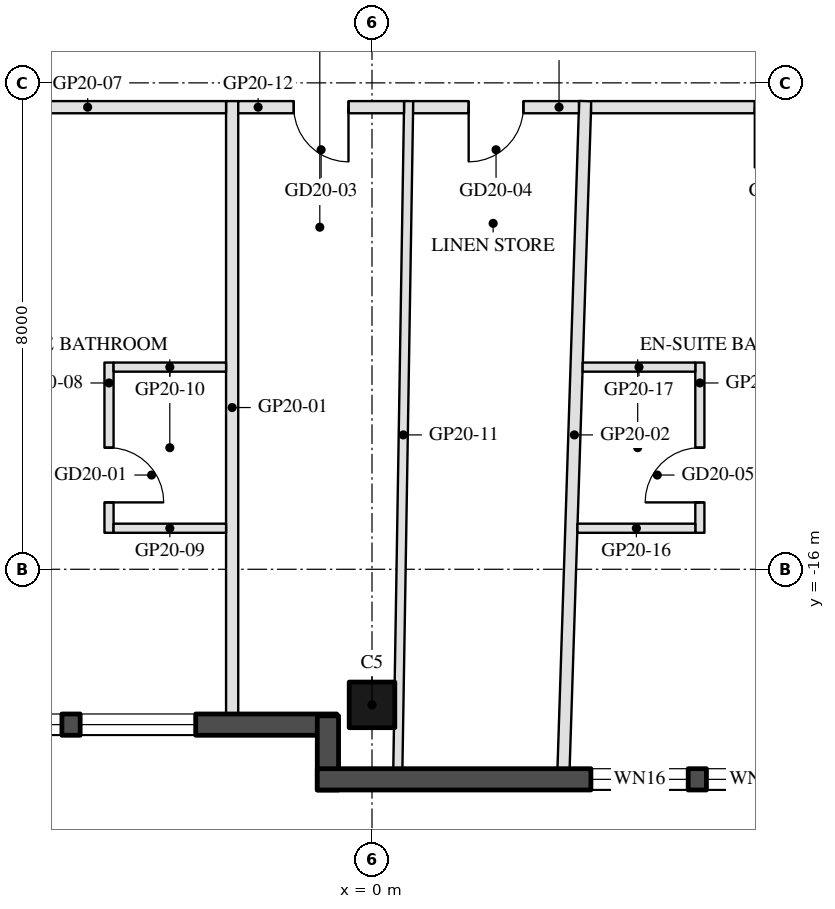
"""IFC4 building model, lengths in metres.
Left out: names, types, materials, properties, quantities, classifications, styles, units other than length and angle.
Written with IfcOpenShell. Run it as: python <this file> out.ifc"""

import sys

from ifc_helpers import new_model, si_unit, direction, frame, frame_2d, origin, origin_2d, place, context, subcontext, project, spatial, rectangle, hollow_rectangle, extrude, element, fill, save


model = new_model("IFC4")
c1 = context("Model", 3, precision=1e-05, world=origin(), true_north=direction((0.0, 1.0)))
c2 = subcontext(c1, "Body", "Model", "MODEL_VIEW")
j1 = project(units=[si_unit("LENGTHUNIT", "METRE"), si_unit("PLANEANGLEUNIT", "RADIAN")], contexts=[c1])
p1 = place(None, origin())
s1 = spatial("IfcSite", under=j1, at=p1, CompositionType="ELEMENT")
p2 = place(p1, origin())
s2 = spatial("IfcBuilding", under=s1, at=p2, CompositionType="ELEMENT")
p3 = place(p2, frame((0.0, 0.0, 209.5)))
s3 = spatial("IfcBuildingStorey", under=s2, at=p3, CompositionType="ELEMENT", Elevation=209.5)
p4 = place(p3, frame((0.0, -18.23, 0.0), z_axis=(0.0, 0.0, 1.0), x_axis=(-1.0, 0.0, 0.0)))
e1 = element("IfcColumn", 1, at=p4, inside=s3, PredefinedType="COLUMN", context=c2, shape_type="SweptSolid", body=[
    extrude(hollow_rectangle(XDim=0.75, YDim=0.75, WallThickness=0.035, at=origin_2d()), origin(), (0.0, 0.0, 1.0), 3.7),
])
p5 = place(p3, frame((-7.32, -18.555, 0.0), z_axis=(0.0, 0.0, 1.0), x_axis=(1.0, 0.0, 0.0)))
e2 = element("IfcWall", 2, at=p5, inside=s3, PredefinedType="SOLIDWALL", context=c2, shape_type="SweptSolid", body=[
    extrude(rectangle(XDim=6.74, YDim=0.35, at=frame_2d((3.37, 0.0))), origin(), (0.0, 0.0, 1.0), 3.55),
])
p6 = place(p5, frame((0.32, 0.0, 0.3)))
e3 = element("IfcOpeningElement", 3, at=p6, cuts=e2, PredefinedType="OPENING", context=c2, shape_type="SweptSolid", body=[
    extrude(rectangle(XDim=1.9, YDim=2.65, at=frame_2d((0.95, 1.325))), frame((0.0, 0.185, 0.0), z_axis=(0.0, -1.0, 0.0), x_axis=(1.0, 0.0, 0.0)), (0.0, 0.0, 1.0), 0.37),
])
p7 = place(p5, frame((2.521, 0.0, 0.3)))
e4 = element("IfcOpeningElement", 4, at=p7, cuts=e2, PredefinedType="OPENING", context=c2, shape_type="SweptSolid", body=[
    extrude(rectangle(XDim=1.9, YDim=2.65, at=frame_2d((0.95, 1.325))), frame((0.0, 0.185, 0.0), z_axis=(0.0, -1.0, 0.0), x_axis=(1.0, 0.0, 0.0)), (0.0, 0.0, 1.0), 0.37),
])
p8 = place(p3, frame((-0.725, -18.41, 0.0), z_axis=(0.0, 0.0, 1.0), x_axis=(0.0, -1.0, 0.0)))
e5 = element("IfcWall", 5, at=p8, inside=s3, PredefinedType="SOLIDWALL", context=c2, shape_type="SweptSolid", body=[
    extrude(rectangle(XDim=1.22, YDim=0.35, at=frame_2d((0.61, 0.0))), origin(), (0.0, 0.0, 1.0), 3.55),
])
p9 = place(p3, frame((-0.9, -19.455, 0.0), z_axis=(0.0, 0.0, 1.0), x_axis=(1.0, 0.0, 0.0)))
e6 = element("IfcWall", 6, at=p9, inside=s3, PredefinedType="SOLIDWALL", context=c2, shape_type="SweptSolid", body=[
    extrude(rectangle(XDim=9.7, YDim=0.35, at=frame_2d((4.85, 0.0))), origin(), (0.0, 0.0, 1.0), 3.55),
])
p10 = place(p9, frame((4.5, 0.0, 0.3)))
e7 = element("IfcOpeningElement", 7, at=p10, cuts=e6, PredefinedType="OPENING", context=c2, shape_type="SweptSolid", body=[
    extrude(rectangle(XDim=1.6, YDim=2.65, at=frame_2d((0.8, 1.325))), frame((0.0, 0.185, 0.0), z_axis=(0.0, -1.0, 0.0), x_axis=(1.0, 0.0, 0.0)), (0.0, 0.0, 1.0), 0.37),
])
p11 = place(p9, frame((6.4, 0.0, 0.3)))
e8 = element("IfcOpeningElement", 8, at=p11, cuts=e6, PredefinedType="OPENING", context=c2, shape_type="SweptSolid", body=[
    extrude(rectangle(XDim=1.6, YDim=2.65, at=frame_2d((0.8, 1.325))), frame((0.0, 0.185, 0.0), z_axis=(0.0, -1.0, 0.0), x_axis=(1.0, 0.0, 0.0)), (0.0, 0.0, 1.0), 0.37),
])
p12 = place(p3, frame((-2.3, -18.38, 0.0), z_axis=(0.0, 0.0, 1.0), x_axis=(0.0, 1.0, 0.0)))
e9 = element("IfcWall", 9, at=p12, inside=s3, PredefinedType="PARTITIONING", context=c2, shape_type="SweptSolid", body=[
    extrude(rectangle(XDim=10.08, YDim=0.2, at=frame_2d((5.04, 0.0))), origin(), (0.0, 0.0, 1.0), 3.06),
])
p13 = place(p3, frame((3.15, -19.28, 0.0), z_axis=(0.0, 0.0, 1.0), x_axis=(0.032468308586, 0.999472765481, 0.0)))
e10 = element("IfcWall", 10, at=p13, inside=s3, PredefinedType="PARTITIONING", context=c2, shape_type="SweptSolid", body=[
    extrude(rectangle(XDim=10.986, YDim=0.2, at=frame_2d((5.493, 0.0))), origin(), (0.0, 0.0, 1.0), 3.06),
])
p14 = place(p3, frame((-2.4, -8.4, 0.0), z_axis=(0.0, 0.0, 1.0), x_axis=(-1.0, 0.0, 0.0)))
e11 = element("IfcWall", 11, at=p14, inside=s3, PredefinedType="PARTITIONING", context=c2, shape_type="SweptSolid", body=[
    extrude(rectangle(XDim=7.588, YDim=0.2, at=frame_2d((3.794, 0.0))), origin(), (0.0, 0.0, 1.0), 2.95),
])
p15 = place(p14, frame((3.294, 0.0, 0.0)))
e12 = element("IfcOpeningElement", 12, at=p15, cuts=e11, PredefinedType="OPENING", context=c2, shape_type="SweptSolid", body=[
    extrude(rectangle(XDim=1.0, YDim=2.1, at=frame_2d((0.5, 1.05))), frame((0.0, 0.11, 0.0), z_axis=(0.0, -1.0, 0.0), x_axis=(1.0, 0.0, 0.0)), (0.0, 0.0, 1.0), 0.22),
])
p16 = place(p3, frame((-4.325, -12.6, 0.0), z_axis=(0.0, 0.0, 1.0), x_axis=(0.0, -1.0, 0.0)))
e13 = element("IfcWall", 13, at=p16, inside=s3, PredefinedType="PARTITIONING", context=c2, shape_type="SweptSolid", body=[
    extrude(rectangle(XDim=2.8, YDim=0.15, at=frame_2d((1.4, 0.0))), origin(), (0.0, 0.0, 1.0), 3.55),
])
p17 = place(p16, frame((1.4, 0.0, 0.0)))
e14 = element("IfcOpeningElement", 14, at=p17, cuts=e13, PredefinedType="OPENING", context=c2, shape_type="SweptSolid", body=[
    extrude(rectangle(XDim=0.9, YDim=2.1, at=frame_2d((0.45, 1.05))), frame((0.0, 0.085, 0.0), z_axis=(0.0, -1.0, 0.0), x_axis=(1.0, 0.0, 0.0)), (0.0, 0.0, 1.0), 0.17),
])
for number, where, z_axis, x_axis in (
    (15, (-4.25, -15.325, 0.0), (0.0, 0.0, 1.0), (1.0, 0.0, 0.0)),
    (16, (-4.25, -12.675, 0.0), (0.0, 0.0, 1.0), (1.0, 0.0, 0.0)),
):
    element("IfcWall", number, at=place(p3, frame(where, z_axis=z_axis, x_axis=x_axis)), inside=s3, PredefinedType="PARTITIONING", context=c2, shape_type="SweptSolid", body=[
        extrude(rectangle(XDim=1.85, YDim=0.15, at=frame_2d((0.925, 0.0))), origin(), (0.0, 0.0, 1.0), 2.95),
    ])
p18 = place(p3, frame((0.425, -19.28, 0.0), z_axis=(0.0, 0.0, 1.0), x_axis=(0.016229462675, 0.999868293597, 0.0)))
e17 = element("IfcWall", 17, at=p18, inside=s3, PredefinedType="PARTITIONING", context=c2, shape_type="SweptSolid", body=[
    extrude(rectangle(XDim=10.981, YDim=0.15, at=frame_2d((5.491, 0.0))), origin(), (0.0, 0.0, 1.0), 3.06),
])
p19 = place(p3, frame((0.527, -8.4, 0.0), z_axis=(0.0, 0.0, 1.0), x_axis=(-1.0, 0.0, 0.0)))
e18 = element("IfcWall", 18, at=p19, inside=s3, PredefinedType="PARTITIONING", context=c2, shape_type="SweptSolid", body=[
    extrude(rectangle(XDim=2.727, YDim=0.2, at=frame_2d((1.363, 0.0))), origin(), (0.0, 0.0, 1.0), 2.95),
])
p20 = place(p19, frame((0.913, 0.0, 0.0)))
e19 = element("IfcOpeningElement", 19, at=p20, cuts=e18, PredefinedType="OPENING", context=c2, shape_type="SweptSolid", body=[
    extrude(rectangle(XDim=0.9, YDim=2.1, at=frame_2d((0.45, 1.05))), frame((0.0, 0.11, 0.0), z_axis=(0.0, -1.0, 0.0), x_axis=(1.0, 0.0, 0.0)), (0.0, 0.0, 1.0), 0.22),
])
p21 = place(p3, frame((3.403, -8.4, 0.0), z_axis=(0.0, 0.0, 1.0), x_axis=(-1.0, 0.0, 0.0)))
e20 = element("IfcWall", 20, at=p21, inside=s3, PredefinedType="PARTITIONING", context=c2, shape_type="SweptSolid", body=[
    extrude(rectangle(XDim=2.727, YDim=0.2, at=frame_2d((1.363, 0.0))), origin(), (0.0, 0.0, 1.0), 3.55),
])
p22 = place(p21, frame((0.913, 0.0, 0.0)))
e21 = element("IfcOpeningElement", 21, at=p22, cuts=e20, PredefinedType="OPENING", context=c2, shape_type="SweptSolid", body=[
    extrude(rectangle(XDim=0.9, YDim=2.1, at=frame_2d((0.45, 1.05))), frame((0.0, 0.11, 0.0), z_axis=(0.0, -1.0, 0.0), x_axis=(1.0, 0.0, 0.0)), (0.0, 0.0, 1.0), 0.22),
])
p23 = place(p3, frame((9.988, -8.4, 0.0), z_axis=(0.0, 0.0, 1.0), x_axis=(-1.0, 0.0, 0.0)))
e22 = element("IfcWall", 22, at=p23, inside=s3, PredefinedType="PARTITIONING", context=c2, shape_type="SweptSolid", body=[
    extrude(rectangle(XDim=6.385, YDim=0.2, at=frame_2d((3.192, 0.0))), origin(), (0.0, 0.0, 1.0), 2.95),
])
p24 = place(p23, frame((2.692, 0.0, 0.0)))
e23 = element("IfcOpeningElement", 23, at=p24, cuts=e22, PredefinedType="OPENING", context=c2, shape_type="SweptSolid", body=[
    extrude(rectangle(XDim=1.0, YDim=2.1, at=frame_2d((0.5, 1.05))), frame((0.0, 0.11, 0.0), z_axis=(0.0, -1.0, 0.0), x_axis=(1.0, 0.0, 0.0)), (0.0, 0.0, 1.0), 0.22),
])
p25 = place(p3, frame((5.392, -15.4, 0.0), z_axis=(0.0, 0.0, 1.0), x_axis=(0.0, 1.0, 0.0)))
e24 = element("IfcWall", 24, at=p25, inside=s3, PredefinedType="PARTITIONING", context=c2, shape_type="SweptSolid", body=[
    extrude(rectangle(XDim=2.8, YDim=0.15, at=frame_2d((1.4, 0.0))), origin(), (0.0, 0.0, 1.0), 3.55),
])
p26 = place(p25, frame((0.5, 0.0, 0.0)))
e25 = element("IfcOpeningElement", 25, at=p26, cuts=e24, PredefinedType="OPENING", context=c2, shape_type="SweptSolid", body=[
    extrude(rectangle(XDim=0.9, YDim=2.1, at=frame_2d((0.45, 1.05))), frame((0.0, 0.085, 0.0), z_axis=(0.0, -1.0, 0.0), x_axis=(1.0, 0.0, 0.0)), (0.0, 0.0, 1.0), 0.17),
])
p27 = place(p3, frame((3.378, -15.325, 0.0), z_axis=(0.0, 0.0, 1.0), x_axis=(1.0, 0.0, 0.0)))
e26 = element("IfcWall", 26, at=p27, inside=s3, PredefinedType="PARTITIONING", context=c2, shape_type="SweptSolid", body=[
    extrude(rectangle(XDim=1.938, YDim=0.15, at=frame_2d((0.969, 0.0))), origin(), (0.0, 0.0, 1.0), 2.95),
])
p28 = place(p3, frame((3.465, -12.675, 0.0), z_axis=(0.0, 0.0, 1.0), x_axis=(1.0, 0.0, 0.0)))
e27 = element("IfcWall", 27, at=p28, inside=s3, PredefinedType="PARTITIONING", context=c2, shape_type="SweptSolid", body=[
    extrude(rectangle(XDim=1.852, YDim=0.15, at=frame_2d((0.926, 0.0))), origin(), (0.0, 0.0, 1.0), 2.95),
])
p29 = place(p6, origin())
e28 = element("IfcWindow", 28, at=p29, inside=s3, PartitioningType="SINGLE_PANEL", PredefinedType="WINDOW", context=c2, shape_type="SweptSolid", body=[
    extrude(rectangle(XDim=1.9, YDim=2.65, at=frame_2d((0.95, 1.325))), frame((0.0, 0.03, 0.0), z_axis=(0.0, -1.0, 0.0), x_axis=(1.0, 0.0, 0.0)), (0.0, 0.0, 1.0), 0.06),
])
fill(e3, e28)
p30 = place(p7, origin())
e29 = element("IfcWindow", 29, at=p30, inside=s3, PartitioningType="SINGLE_PANEL", PredefinedType="WINDOW", context=c2, shape_type="SweptSolid", body=[
    extrude(rectangle(XDim=1.9, YDim=2.65, at=frame_2d((0.95, 1.325))), frame((0.0, 0.03, 0.0), z_axis=(0.0, -1.0, 0.0), x_axis=(1.0, 0.0, 0.0)), (0.0, 0.0, 1.0), 0.06),
])
fill(e4, e29)
p31 = place(p10, origin())
e30 = element("IfcWindow", 30, at=p31, inside=s3, PartitioningType="SINGLE_PANEL", PredefinedType="WINDOW", context=c2, shape_type="SweptSolid", body=[
    extrude(rectangle(XDim=1.6, YDim=2.65, at=frame_2d((0.8, 1.325))), frame((0.0, 0.03, 0.0), z_axis=(0.0, -1.0, 0.0), x_axis=(1.0, 0.0, 0.0)), (0.0, 0.0, 1.0), 0.06),
])
fill(e7, e30)
p32 = place(p11, origin())
e31 = element("IfcWindow", 31, at=p32, inside=s3, PartitioningType="SINGLE_PANEL", PredefinedType="WINDOW", context=c2, shape_type="SweptSolid", body=[
    extrude(rectangle(XDim=1.6, YDim=2.65, at=frame_2d((0.8, 1.325))), frame((0.0, 0.03, 0.0), z_axis=(0.0, -1.0, 0.0), x_axis=(1.0, 0.0, 0.0)), (0.0, 0.0, 1.0), 0.06),
])
fill(e8, e31)
p33 = place(p17, origin())
e32 = element("IfcDoor", 32, at=p33, inside=s3, OperationType="SINGLE_SWING_RIGHT", PredefinedType="DOOR", context=c2, shape_type="SweptSolid", body=[
    extrude(rectangle(XDim=0.9, YDim=2.1, at=frame_2d((0.45, 1.05))), frame((0.0, 0.025, 0.0), z_axis=(0.0, -1.0, 0.0), x_axis=(1.0, 0.0, 0.0)), (0.0, 0.0, 1.0), 0.05),
])
fill(e14, e32)
p34 = place(p20, origin())
e33 = element("IfcDoor", 33, at=p34, inside=s3, OperationType="SINGLE_SWING_LEFT", PredefinedType="DOOR", context=c2, shape_type="SweptSolid", body=[
    extrude(rectangle(XDim=0.9, YDim=2.1, at=frame_2d((0.45, 1.05))), frame((0.0, 0.025, 0.0), z_axis=(0.0, -1.0, 0.0), x_axis=(1.0, 0.0, 0.0)), (0.0, 0.0, 1.0), 0.05),
])
fill(e19, e33)
p35 = place(p22, origin())
e34 = element("IfcDoor", 34, at=p35, inside=s3, OperationType="SINGLE_SWING_RIGHT", PredefinedType="DOOR", context=c2, shape_type="SweptSolid", body=[
    extrude(rectangle(XDim=0.9, YDim=2.1, at=frame_2d((0.45, 1.05))), frame((0.0, 0.025, 0.0), z_axis=(0.0, -1.0, 0.0), x_axis=(1.0, 0.0, 0.0)), (0.0, 0.0, 1.0), 0.05),
])
fill(e21, e34)
p36 = place(p26, origin())
e35 = element("IfcDoor", 35, at=p36, inside=s3, OperationType="SINGLE_SWING_LEFT", PredefinedType="DOOR", context=c2, shape_type="SweptSolid", body=[
    extrude(rectangle(XDim=0.9, YDim=2.1, at=frame_2d((0.45, 1.05))), frame((0.0, 0.025, 0.0), z_axis=(0.0, -1.0, 0.0), x_axis=(1.0, 0.0, 0.0)), (0.0, 0.0, 1.0), 0.05),
])
fill(e25, e35)
p37 = place(p24, origin())
e36 = element("IfcDoor", 36, at=p37, inside=s3, OperationType="SINGLE_SWING_RIGHT", PredefinedType="DOOR", context=c2, shape_type="SweptSolid", body=[
    extrude(rectangle(XDim=1.0, YDim=2.1, at=frame_2d((0.5, 1.05))), frame((0.0, 0.025, 0.0), z_axis=(0.0, -1.0, 0.0), x_axis=(1.0, 0.0, 0.0)), (0.0, 0.0, 1.0), 0.05),
])
fill(e23, e36)
save(model, sys.argv[1])
